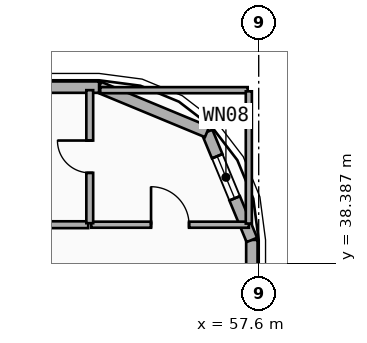
"""IFC4 building model, lengths in metres.
Left out: names, types, materials, properties, quantities, classifications, styles, units other than length and angle.
Written with IfcOpenShell. Run it as: python <this file> out.ifc"""

import sys

from ifc_helpers import new_model, si_unit, direction, frame, frame_2d, origin, place, context, subcontext, project, spatial, rectangle, extrude, element, fill, save


model = new_model("IFC4")
c1 = context("Model", 3, precision=1e-05, world=origin(), true_north=direction((0.0, 1.0)))
c2 = subcontext(c1, "Body", "Model", "MODEL_VIEW")
j1 = project(units=[si_unit("LENGTHUNIT", "METRE"), si_unit("PLANEANGLEUNIT", "RADIAN")], contexts=[c1])
p1 = place(None, origin())
s1 = spatial("IfcSite", under=j1, at=p1, CompositionType="ELEMENT")
p2 = place(p1, origin())
s2 = spatial("IfcBuilding", under=s1, at=p2, CompositionType="ELEMENT")
p3 = place(p2, frame((0.0, 0.0, 118.8)))
s3 = spatial("IfcBuildingStorey", under=s2, at=p3, CompositionType="ELEMENT", Elevation=118.8)
p4 = place(p3, frame((57.42, 39.0, 0.0), z_axis=(0.0, 0.0, 1.0), x_axis=(0.0, -1.0, 0.0)))
e1 = element("IfcWall", 1, at=p4, inside=s3, PredefinedType="SOLIDWALL", context=c2, shape_type="SweptSolid", body=[
    extrude(rectangle(XDim=18.0, YDim=0.3, at=frame_2d((9.0, 0.0))), origin(), (0.0, 0.0, 1.0), 3.24),
])
p5 = place(p4, frame((8.882, 0.0, 0.48)))
e2 = element("IfcOpeningElement", 2, at=p5, cuts=e1, PredefinedType="OPENING", context=c2, shape_type="SweptSolid", body=[
    extrude(rectangle(XDim=1.4, YDim=1.8, at=frame_2d((0.7, 0.9))), frame((0.0, 0.16, 0.0), z_axis=(0.0, -1.0, 0.0), x_axis=(1.0, 0.0, 0.0)), (0.0, 0.0, 1.0), 0.32),
])
p6 = place(p4, frame((3.621, 0.0, 0.48)))
e3 = element("IfcOpeningElement", 3, at=p6, cuts=e1, PredefinedType="OPENING", context=c2, shape_type="SweptSolid", body=[
    extrude(rectangle(XDim=1.4, YDim=1.8, at=frame_2d((0.7, 0.9))), frame((0.0, 0.16, 0.0), z_axis=(0.0, -1.0, 0.0), x_axis=(1.0, 0.0, 0.0)), (0.0, 0.0, 1.0), 0.32),
])
p7 = place(p4, frame((16.28, 0.0, 0.65)))
e4 = element("IfcOpeningElement", 4, at=p7, cuts=e1, PredefinedType="OPENING", context=c2, shape_type="SweptSolid", body=[
    extrude(rectangle(XDim=1.4, YDim=1.8, at=frame_2d((0.7, 0.9))), frame((0.0, 0.16, 0.0), z_axis=(0.0, -1.0, 0.0), x_axis=(1.0, 0.0, 0.0)), (0.0, 0.0, 1.0), 0.32),
])
p8 = place(p3, frame((56.243, 41.843, 0.0), z_axis=(0.0, 0.0, 1.0), x_axis=(0.382636798336, -0.92389884758, 0.0)))
e5 = element("IfcWall", 5, at=p8, inside=s3, PredefinedType="SOLIDWALL", context=c2, shape_type="SweptSolid", body=[
    extrude(rectangle(XDim=3.077, YDim=0.3, at=frame_2d((1.538, 0.0))), origin(), (0.0, 0.0, 1.0), 3.24),
])
p9 = place(p8, frame((0.693, 0.0, 0.75)))
e6 = element("IfcOpeningElement", 6, at=p9, cuts=e5, PredefinedType="OPENING", context=c2, shape_type="SweptSolid", body=[
    extrude(rectangle(XDim=1.2, YDim=1.5, at=frame_2d((0.6, 0.75))), frame((0.0, 0.16, 0.0), z_axis=(0.0, -1.0, 0.0), x_axis=(1.0, 0.0, 0.0)), (0.0, 0.0, 1.0), 0.32),
])
p10 = place(p3, frame((53.4, 43.02, 0.0), z_axis=(0.0, 0.0, 1.0), x_axis=(0.923882414032, -0.382676475685, 0.0)))
e7 = element("IfcWall", 7, at=p10, inside=s3, PredefinedType="SOLIDWALL", context=c2, shape_type="SweptSolid", body=[
    extrude(rectangle(XDim=3.077, YDim=0.3, at=frame_2d((1.539, 0.0))), origin(), (0.0, 0.0, 1.0), 3.24),
])
p11 = place(p3, frame((4.2, 43.02, 0.0), z_axis=(0.0, 0.0, 1.0), x_axis=(1.0, 0.0, 0.0)))
e8 = element("IfcWall", 8, at=p11, inside=s3, PredefinedType="SOLIDWALL", context=c2, shape_type="SweptSolid", body=[
    extrude(rectangle(XDim=49.2, YDim=0.3, at=frame_2d((24.6, 0.0))), origin(), (0.0, 0.0, 1.0), 3.24),
])
p12 = place(p11, frame((9.09, 0.0, 0.85)))
e9 = element("IfcOpeningElement", 9, at=p12, cuts=e8, PredefinedType="OPENING", context=c2, shape_type="SweptSolid", body=[
    extrude(rectangle(XDim=1.4, YDim=1.8, at=frame_2d((0.7, 0.9))), frame((0.0, 0.16, 0.0), z_axis=(0.0, -1.0, 0.0), x_axis=(1.0, 0.0, 0.0)), (0.0, 0.0, 1.0), 0.32),
])
p13 = place(p11, frame((11.92, 0.0, 0.85)))
e10 = element("IfcOpeningElement", 10, at=p13, cuts=e8, PredefinedType="OPENING", context=c2, shape_type="SweptSolid", body=[
    extrude(rectangle(XDim=1.4, YDim=1.8, at=frame_2d((0.7, 0.9))), frame((0.0, 0.16, 0.0), z_axis=(0.0, -1.0, 0.0), x_axis=(1.0, 0.0, 0.0)), (0.0, 0.0, 1.0), 0.32),
])
p14 = place(p11, frame((18.627, 0.0, 0.85)))
e11 = element("IfcOpeningElement", 11, at=p14, cuts=e8, PredefinedType="OPENING", context=c2, shape_type="SweptSolid", body=[
    extrude(rectangle(XDim=1.4, YDim=1.8, at=frame_2d((0.7, 0.9))), frame((0.0, 0.16, 0.0), z_axis=(0.0, -1.0, 0.0), x_axis=(1.0, 0.0, 0.0)), (0.0, 0.0, 1.0), 0.32),
])
p15 = place(p11, frame((24.669, 0.0, 0.85)))
e12 = element("IfcOpeningElement", 12, at=p15, cuts=e8, PredefinedType="OPENING", context=c2, shape_type="SweptSolid", body=[
    extrude(rectangle(XDim=1.4, YDim=1.8, at=frame_2d((0.7, 0.9))), frame((0.0, 0.16, 0.0), z_axis=(0.0, -1.0, 0.0), x_axis=(1.0, 0.0, 0.0)), (0.0, 0.0, 1.0), 0.32),
])
p16 = place(p11, frame((27.235, 0.0, 0.85)))
e13 = element("IfcOpeningElement", 13, at=p16, cuts=e8, PredefinedType="OPENING", context=c2, shape_type="SweptSolid", body=[
    extrude(rectangle(XDim=1.4, YDim=1.8, at=frame_2d((0.7, 0.9))), frame((0.0, 0.16, 0.0), z_axis=(0.0, -1.0, 0.0), x_axis=(1.0, 0.0, 0.0)), (0.0, 0.0, 1.0), 0.32),
])
p17 = place(p11, frame((33.65, 0.0, 0.85)))
e14 = element("IfcOpeningElement", 14, at=p17, cuts=e8, PredefinedType="OPENING", context=c2, shape_type="SweptSolid", body=[
    extrude(rectangle(XDim=1.4, YDim=1.8, at=frame_2d((0.7, 0.9))), frame((0.0, 0.16, 0.0), z_axis=(0.0, -1.0, 0.0), x_axis=(1.0, 0.0, 0.0)), (0.0, 0.0, 1.0), 0.32),
])
p18 = place(p11, frame((36.25, 0.0, 0.85)))
e15 = element("IfcOpeningElement", 15, at=p18, cuts=e8, PredefinedType="OPENING", context=c2, shape_type="SweptSolid", body=[
    extrude(rectangle(XDim=1.4, YDim=1.8, at=frame_2d((0.7, 0.9))), frame((0.0, 0.16, 0.0), z_axis=(0.0, -1.0, 0.0), x_axis=(1.0, 0.0, 0.0)), (0.0, 0.0, 1.0), 0.32),
])
p19 = place(p11, frame((44.377, 0.0, 0.85)))
e16 = element("IfcOpeningElement", 16, at=p19, cuts=e8, PredefinedType="OPENING", context=c2, shape_type="SweptSolid", body=[
    extrude(rectangle(XDim=1.4, YDim=1.8, at=frame_2d((0.7, 0.9))), frame((0.0, 0.16, 0.0), z_axis=(0.0, -1.0, 0.0), x_axis=(1.0, 0.0, 0.0)), (0.0, 0.0, 1.0), 0.32),
])
p20 = place(p3, frame((53.194, 39.4, 0.0), z_axis=(0.0, 0.0, 1.0), x_axis=(1.0, 0.0, 0.0)))
e17 = element("IfcWall", 17, at=p20, inside=s3, PredefinedType="PARTITIONING", context=c2, shape_type="SweptSolid", body=[
    extrude(rectangle(XDim=4.146, YDim=0.16, at=frame_2d((2.073, 0.0))), origin(), (0.0, 0.0, 1.0), 3.24),
])
p21 = place(p20, frame((1.573, 0.0, 0.0)))
e18 = element("IfcOpeningElement", 18, at=p21, cuts=e17, PredefinedType="OPENING", context=c2, shape_type="SweptSolid", body=[
    extrude(rectangle(XDim=1.0, YDim=2.15, at=frame_2d((0.5, 1.075))), frame((0.0, 0.09, 0.0), z_axis=(0.0, -1.0, 0.0), x_axis=(1.0, 0.0, 0.0)), (0.0, 0.0, 1.0), 0.18),
])
p22 = place(p3, frame((51.544, 39.4, 0.0), z_axis=(0.0, 0.0, 1.0), x_axis=(1.0, 0.0, 0.0)))
e19 = element("IfcWall", 19, at=p22, inside=s3, PredefinedType="PLUMBINGWALL", context=c2, shape_type="SweptSolid", body=[
    extrude(rectangle(XDim=1.57, YDim=0.18, at=frame_2d((0.785, 0.0))), origin(), (0.0, 0.0, 1.0), 3.24),
])
p23 = place(p3, frame((53.154, 39.44, 0.0), z_axis=(0.0, 0.0, 1.0), x_axis=(0.0, 1.0, 0.0)))
e20 = element("IfcWall", 20, at=p23, inside=s3, PredefinedType="PLUMBINGWALL", context=c2, shape_type="SweptSolid", body=[
    extrude(rectangle(XDim=3.5, YDim=0.18, at=frame_2d((1.75, 0.0))), origin(), (0.0, 0.0, 1.0), 3.24),
])
p24 = place(p23, frame((1.325, 0.0, 0.0)))
e21 = element("IfcOpeningElement", 21, at=p24, cuts=e20, PredefinedType="OPENING", context=c2, shape_type="SweptSolid", body=[
    extrude(rectangle(XDim=0.85, YDim=2.1, at=frame_2d((0.425, 1.05))), frame((0.0, 0.1, 0.0), z_axis=(0.0, -1.0, 0.0), x_axis=(1.0, 0.0, 0.0)), (0.0, 0.0, 1.0), 0.2),
])
p25 = place(p3, frame((53.43, 42.94, 0.0), z_axis=(0.0, 0.0, 1.0), x_axis=(1.0, 0.0, 0.0)))
e22 = element("IfcWall", 22, at=p25, inside=s3, PredefinedType="PARTITIONING", context=c2, shape_type="SweptSolid", body=[
    extrude(rectangle(XDim=3.88, YDim=0.16, at=frame_2d((1.94, 0.0))), origin(), (0.0, 0.0, 1.0), 3.24),
])
p26 = place(p3, frame((57.34, 39.43, 0.0), z_axis=(0.0, 0.0, 1.0), x_axis=(0.0, 1.0, 0.0)))
e23 = element("IfcWall", 23, at=p26, inside=s3, PredefinedType="PARTITIONING", context=c2, shape_type="SweptSolid", body=[
    extrude(rectangle(XDim=3.48, YDim=0.16, at=frame_2d((1.74, 0.0))), origin(), (0.0, 0.0, 1.0), 3.24),
])
p27 = place(p9, origin())
e24 = element("IfcWindow", 24, at=p27, inside=s3, PartitioningType="SINGLE_PANEL", PredefinedType="WINDOW", context=c2, shape_type="SweptSolid", body=[
    extrude(rectangle(XDim=1.2, YDim=1.5, at=frame_2d((0.6, 0.75))), frame((0.0, 0.03, 0.0), z_axis=(0.0, -1.0, 0.0), x_axis=(1.0, 0.0, 0.0)), (0.0, 0.0, 1.0), 0.06),
])
fill(e6, e24)
p28 = place(p21, origin())
e25 = element("IfcDoor", 25, at=p28, inside=s3, OperationType="SINGLE_SWING_LEFT", PredefinedType="DOOR", context=c2, shape_type="SweptSolid", body=[
    extrude(rectangle(XDim=1.0, YDim=2.15, at=frame_2d((0.5, 1.075))), frame((0.0, 0.025, 0.0), z_axis=(0.0, -1.0, 0.0), x_axis=(1.0, 0.0, 0.0)), (0.0, 0.0, 1.0), 0.05),
])
fill(e18, e25)
p29 = place(p24, origin())
e26 = element("IfcDoor", 26, at=p29, inside=s3, OperationType="SINGLE_SWING_RIGHT", PredefinedType="DOOR", context=c2, shape_type="SweptSolid", body=[
    extrude(rectangle(XDim=0.85, YDim=2.1, at=frame_2d((0.425, 1.05))), frame((0.0, 0.025, 0.0), z_axis=(0.0, -1.0, 0.0), x_axis=(1.0, 0.0, 0.0)), (0.0, 0.0, 1.0), 0.05),
])
fill(e21, e26)
save(model, sys.argv[1])
